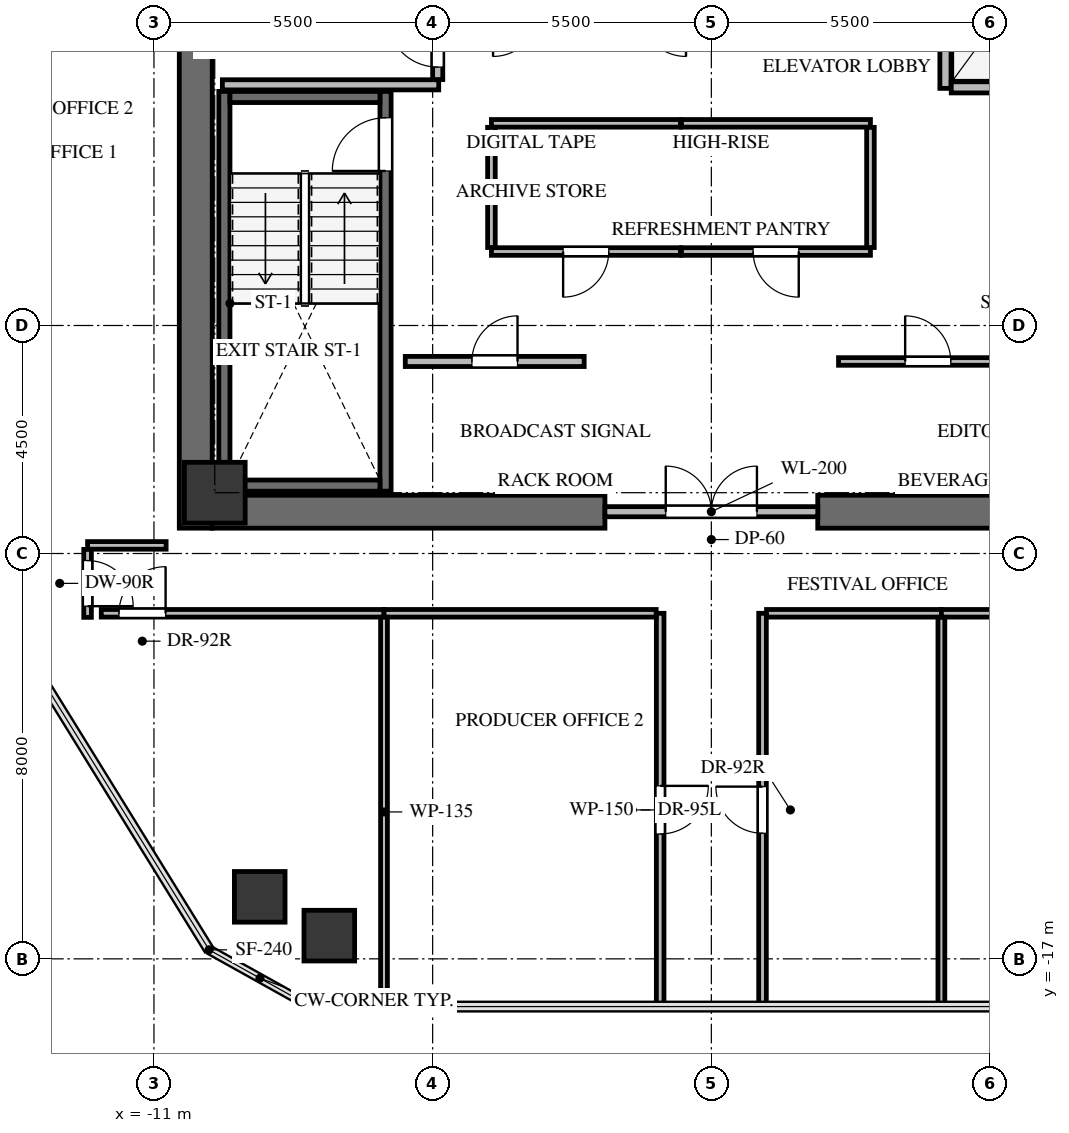
"""IFC4 building model, lengths in metres.
Left out: names, types, materials, properties, quantities, classifications, styles, units other than length and angle.
Written with IfcOpenShell. Run it as: python <this file> out.ifc"""

import sys

from ifc_helpers import new_model, si_unit, direction, frame, frame_2d, origin, origin_2d, place, context, subcontext, project, spatial, rectangle, extrude, source, transform, mapped, element, fill, save


model = new_model("IFC4")
c1 = context("Model", 3, precision=1e-05, world=origin(), true_north=direction((0.0, 1.0)))
c2 = subcontext(c1, "Body", "Model", "MODEL_VIEW")
j1 = project(units=[si_unit("LENGTHUNIT", "METRE"), si_unit("PLANEANGLEUNIT", "RADIAN")], contexts=[c1])
p1 = place(None, origin())
s1 = spatial("IfcSite", under=j1, at=p1, CompositionType="ELEMENT")
p2 = place(p1, origin())
s2 = spatial("IfcBuilding", under=s1, at=p2, CompositionType="ELEMENT")
p3 = place(p2, frame((0.0, 0.0, 173.8)))
s3 = spatial("IfcBuildingStorey", under=s2, at=p3, CompositionType="ELEMENT", Elevation=173.8)
p4 = place(p3, frame((-10.175, -8.5, 0.0), z_axis=(0.0, 0.0, 1.0), x_axis=(0.0, 1.0, 0.0)))
e1 = element("IfcWall", 1, at=p4, inside=s3, PredefinedType="SHEAR", context=c2, shape_type="SweptSolid", body=[
    extrude(rectangle(XDim=17.0, YDim=0.65, at=frame_2d((8.5, 0.0))), origin(), (0.0, 0.0, 1.0), 3.3),
])
for number, where, z_axis, x_axis in (
    (2, (-9.85, -8.175, 0.0), (0.0, 0.0, 1.0), (1.0, 0.0, 0.0)),
    (3, (2.1, -8.175, 0.0), (0.0, 0.0, 1.0), (1.0, 0.0, 0.0)),
):
    element("IfcWall", number, at=place(p3, frame(where, z_axis=z_axis, x_axis=x_axis)), inside=s3, PredefinedType="SHEAR", context=c2, shape_type="SweptSolid", body=[
        extrude(rectangle(XDim=7.75, YDim=0.65, at=frame_2d((3.875, 0.0))), origin(), (0.0, 0.0, 1.0), 3.3),
    ])
p5 = place(p3, frame((-6.43, -7.77, -0.24), z_axis=(0.0, 0.0, 1.0), x_axis=(0.0, 1.0, 0.0)))
e4 = element("IfcWall", 4, at=p5, inside=s3, PredefinedType="SHEAR", context=c2, shape_type="SweptSolid", body=[
    extrude(rectangle(XDim=7.89, YDim=0.22, at=frame_2d((3.945, 0.0))), origin(), (0.0, 0.0, 1.0), 3.3),
])
p6 = place(p5, frame((6.32, 0.0, 0.0)))
e5 = element("IfcOpeningElement", 5, at=p6, cuts=e4, PredefinedType="OPENING", context=c2, shape_type="SweptSolid", body=[
    extrude(rectangle(XDim=1.05, YDim=2.15, at=frame_2d((0.525, 1.075))), frame((0.0, 0.12, 0.0), z_axis=(0.0, -1.0, 0.0), x_axis=(1.0, 0.0, 0.0)), (0.0, 0.0, 1.0), 0.24),
])
p7 = place(p3, frame((-9.61, 0.12, -0.24), z_axis=(0.0, 0.0, 1.0), x_axis=(0.0, -1.0, 0.0)))
e6 = element("IfcWall", 6, at=p7, inside=s3, PredefinedType="SHEAR", context=c2, shape_type="SweptSolid", body=[
    extrude(rectangle(XDim=7.89, YDim=0.22, at=frame_2d((3.945, 0.0))), origin(), (0.0, 0.0, 1.0), 3.3),
])
for number, where, z_axis, x_axis in (
    (7, (-9.5, -7.66, -0.24), (0.0, 0.0, 1.0), (1.0, 0.0, 0.0)),
    (8, (-6.54, 0.01, -0.24), (0.0, 0.0, 1.0), (-1.0, 0.0, 0.0)),
):
    element("IfcWall", number, at=place(p3, frame(where, z_axis=z_axis, x_axis=x_axis)), inside=s3, PredefinedType="SHEAR", context=c2, shape_type="SweptSolid", body=[
        extrude(rectangle(XDim=2.96, YDim=0.22, at=frame_2d((1.48, 0.0))), origin(), (0.0, 0.0, 1.0), 3.3),
    ])
m1 = source(origin(), c2, "Body", "SweptSolid", [
    extrude(rectangle(XDim=1.2, YDim=1.2, at=origin_2d()), origin(), (0.0, 0.0, 1.0), 3.3),
])
p8 = place(p3, frame((-9.8, -7.8, -0.24), z_axis=(0.0, 0.0, 1.0), x_axis=(1.0, 0.0, 0.0)))
e9 = element("IfcColumn", 9, at=p8, inside=s3, PredefinedType="COLUMN", context=c2, shape_type="MappedRepresentation", body=[
    mapped(m1, transform((0.0, 0.0, 0.0), x_axis=(1.0, 0.0, 0.0), y_axis=(0.0, 1.0, 0.0), z_axis=(0.0, 0.0, 1.0), scale=1.0)),
])
m2 = source(origin(), c2, "Body", "SweptSolid", [
    extrude(rectangle(XDim=1.0, YDim=1.0, at=origin_2d()), origin(), (0.0, 0.0, 1.0), 3.3),
])
for number, where, z_axis, x_axis in (
    (10, (-8.913, -15.776, -0.24), (0.0, 0.0, 1.0), (1.0, 0.0, 0.0)),
    (11, (-7.54, -16.542, -0.24), (0.0, 0.0, 1.0), (1.0, 0.0, 0.0)),
):
    element("IfcColumn", number, at=place(p3, frame(where, z_axis=z_axis, x_axis=x_axis)), inside=s3, PredefinedType="COLUMN", context=c2, shape_type="MappedRepresentation", body=[
        mapped(m2, transform((0.0, 0.0, 0.0), x_axis=(1.0, 0.0, 0.0), y_axis=(0.0, 1.0, 0.0), z_axis=(0.0, 0.0, 1.0), scale=1.0)),
    ])
p9 = place(p3, frame((-2.1, -8.175, 0.0), z_axis=(0.0, 0.0, 1.0), x_axis=(1.0, 0.0, 0.0)))
e12 = element("IfcWall", 12, at=p9, inside=s3, PredefinedType="SOLIDWALL", context=c2, shape_type="SweptSolid", body=[
    extrude(rectangle(XDim=4.2, YDim=0.2, at=frame_2d((2.1, 0.0))), origin(), (0.0, 0.0, 1.0), 3.045),
])
p10 = place(p9, frame((1.2, 0.0, 0.0)))
e13 = element("IfcOpeningElement", 13, at=p10, cuts=e12, PredefinedType="OPENING", context=c2, shape_type="SweptSolid", body=[
    extrude(rectangle(XDim=1.8, YDim=2.15, at=frame_2d((0.9, 1.075))), frame((0.0, 0.11, 0.0), z_axis=(0.0, -1.0, 0.0), x_axis=(1.0, 0.0, 0.0)), (0.0, 0.0, 1.0), 0.22),
])
p11 = place(p3, frame((-9.65, 0.25, 0.0), z_axis=(0.0, 0.0, 1.0), x_axis=(1.0, 0.0, 0.0)))
e14 = element("IfcWall", 14, at=p11, inside=s3, PredefinedType="SOLIDWALL", context=c2, shape_type="SweptSolid", body=[
    extrude(rectangle(XDim=4.27, YDim=0.2, at=frame_2d((2.135, 0.0))), origin(), (0.0, 0.0, 1.0), 3.045),
])
p12 = place(p3, frame((-5.4, 0.354, 0.0), z_axis=(0.0, 0.0, 1.0), x_axis=(0.0, 1.0, 0.0)))
e15 = element("IfcWall", 15, at=p12, inside=s3, PredefinedType="SOLIDWALL", context=c2, shape_type="SweptSolid", body=[
    extrude(rectangle(XDim=4.026, YDim=0.2, at=frame_2d((2.013, 0.0))), origin(), (0.0, 0.0, 1.0), 3.045),
])
p13 = place(p12, frame((0.246, 0.0, 0.0)))
e16 = element("IfcOpeningElement", 16, at=p13, cuts=e15, PredefinedType="OPENING", context=c2, shape_type="SweptSolid", body=[
    extrude(rectangle(XDim=1.0, YDim=2.15, at=frame_2d((0.5, 1.075))), frame((0.0, 0.11, 0.0), z_axis=(0.0, -1.0, 0.0), x_axis=(1.0, 0.0, 0.0)), (0.0, 0.0, 1.0), 0.22),
])
p14 = place(p3, frame((4.62, 0.18, 0.0), z_axis=(0.0, 0.0, 1.0), x_axis=(0.0, 1.0, 0.0)))
e17 = element("IfcWall", 17, at=p14, inside=s3, PredefinedType="SOLIDWALL", context=c2, shape_type="SweptSolid", body=[
    extrude(rectangle(XDim=3.186, YDim=0.22, at=frame_2d((1.593, 0.0))), origin(), (0.0, 0.0, 1.0), 3.045),
])
p15 = place(p3, frame((4.734, 0.2, 0.0), z_axis=(0.0, 0.0, 1.0), x_axis=(1.0, 0.0, 0.0)))
e18 = element("IfcWall", 18, at=p15, inside=s3, PredefinedType="SOLIDWALL", context=c2, shape_type="SweptSolid", body=[
    extrude(rectangle(XDim=1.666, YDim=0.22, at=frame_2d((0.833, 0.0))), origin(), (0.0, 0.0, 1.0), 3.045),
])
p16 = place(p3, frame((-6.04, -5.21, 0.0), z_axis=(0.0, 0.0, 1.0), x_axis=(1.0, 0.0, 0.0)))
e19 = element("IfcWall", 19, at=p16, inside=s3, PredefinedType="SOLIDWALL", context=c2, shape_type="SweptSolid", body=[
    extrude(rectangle(XDim=3.53, YDim=0.2, at=frame_2d((1.765, 0.0))), origin(), (0.0, 0.0, 1.0), 3.045),
])
p17 = place(p16, frame((1.315, 0.0, 0.0)))
e20 = element("IfcOpeningElement", 20, at=p17, cuts=e19, PredefinedType="OPENING", context=c2, shape_type="SweptSolid", body=[
    extrude(rectangle(XDim=0.9, YDim=2.05, at=frame_2d((0.45, 1.025))), frame((0.0, 0.11, 0.0), z_axis=(0.0, -1.0, 0.0), x_axis=(1.0, 0.0, 0.0)), (0.0, 0.0, 1.0), 0.22),
])
p18 = place(p3, frame((2.51, -5.21, 0.0), z_axis=(0.0, 0.0, 1.0), x_axis=(1.0, 0.0, 0.0)))
e21 = element("IfcWall", 21, at=p18, inside=s3, PredefinedType="PARTITIONING", context=c2, shape_type="SweptSolid", body=[
    extrude(rectangle(XDim=3.53, YDim=0.15, at=frame_2d((1.765, 0.0))), origin(), (0.0, 0.0, 1.0), 3.045),
])
p19 = place(p18, frame((1.315, 0.0, 0.0)))
e22 = element("IfcOpeningElement", 22, at=p19, cuts=e21, PredefinedType="OPENING", context=c2, shape_type="SweptSolid", body=[
    extrude(rectangle(XDim=0.9, YDim=2.05, at=frame_2d((0.45, 1.025))), frame((0.0, 0.085, 0.0), z_axis=(0.0, -1.0, 0.0), x_axis=(1.0, 0.0, 0.0)), (0.0, 0.0, 1.0), 0.17),
])
p20 = place(p3, frame((-0.61, -3.04, 0.0), z_axis=(0.0, 0.0, 1.0), x_axis=(-1.0, 0.0, 0.0)))
e23 = element("IfcWall", 23, at=p20, inside=s3, PredefinedType="PARTITIONING", context=c2, shape_type="SweptSolid", body=[
    extrude(rectangle(XDim=3.73, YDim=0.15, at=frame_2d((1.865, 0.0))), origin(), (0.0, 0.0, 1.0), 3.045),
])
p21 = place(p20, frame((1.415, 0.0, 0.0)))
e24 = element("IfcOpeningElement", 24, at=p21, cuts=e23, PredefinedType="OPENING", context=c2, shape_type="SweptSolid", body=[
    extrude(rectangle(XDim=0.9, YDim=2.05, at=frame_2d((0.45, 1.025))), frame((0.0, 0.085, 0.0), z_axis=(0.0, -1.0, 0.0), x_axis=(1.0, 0.0, 0.0)), (0.0, 0.0, 1.0), 0.17),
])
p22 = place(p3, frame((-4.34, -0.51, 0.0), z_axis=(0.0, 0.0, 1.0), x_axis=(1.0, 0.0, 0.0)))
e25 = element("IfcWall", 25, at=p22, inside=s3, PredefinedType="PARTITIONING", context=c2, shape_type="SweptSolid", body=[
    extrude(rectangle(XDim=3.73, YDim=0.15, at=frame_2d((1.865, 0.0))), origin(), (0.0, 0.0, 1.0), 3.045),
])
p23 = place(p3, frame((-4.34, -2.961, 0.0), z_axis=(0.0, 0.0, 1.0), x_axis=(0.0, 1.0, 0.0)))
e26 = element("IfcWall", 26, at=p23, inside=s3, PredefinedType="PARTITIONING", context=c2, shape_type="SweptSolid", body=[
    extrude(rectangle(XDim=2.372, YDim=0.15, at=frame_2d((1.186, 0.0))), origin(), (0.0, 0.0, 1.0), 3.045),
])
p24 = place(p3, frame((3.14, -3.04, 0.0), z_axis=(0.0, 0.0, 1.0), x_axis=(-1.0, 0.0, 0.0)))
e27 = element("IfcWall", 27, at=p24, inside=s3, PredefinedType="PARTITIONING", context=c2, shape_type="SweptSolid", body=[
    extrude(rectangle(XDim=3.73, YDim=0.15, at=frame_2d((1.865, 0.0))), origin(), (0.0, 0.0, 1.0), 3.045),
])
p25 = place(p24, frame((1.415, 0.0, 0.0)))
e28 = element("IfcOpeningElement", 28, at=p25, cuts=e27, PredefinedType="OPENING", context=c2, shape_type="SweptSolid", body=[
    extrude(rectangle(XDim=0.9, YDim=2.05, at=frame_2d((0.45, 1.025))), frame((0.0, 0.085, 0.0), z_axis=(0.0, -1.0, 0.0), x_axis=(1.0, 0.0, 0.0)), (0.0, 0.0, 1.0), 0.17),
])
p26 = place(p3, frame((-0.59, -0.51, 0.0), z_axis=(0.0, 0.0, 1.0), x_axis=(1.0, 0.0, 0.0)))
e29 = element("IfcWall", 29, at=p26, inside=s3, PredefinedType="PARTITIONING", context=c2, shape_type="SweptSolid", body=[
    extrude(rectangle(XDim=3.73, YDim=0.15, at=frame_2d((1.865, 0.0))), origin(), (0.0, 0.0, 1.0), 3.045),
])
p27 = place(p3, frame((3.14, -0.589, 0.0), z_axis=(0.0, 0.0, 1.0), x_axis=(0.0, -1.0, 0.0)))
e30 = element("IfcWall", 30, at=p27, inside=s3, PredefinedType="PARTITIONING", context=c2, shape_type="SweptSolid", body=[
    extrude(rectangle(XDim=2.372, YDim=0.15, at=frame_2d((1.186, 0.0))), origin(), (0.0, 0.0, 1.0), 3.045),
])
p28 = place(p3, frame((-12.04, -10.18, 0.0), z_axis=(0.0, 0.0, 1.0), x_axis=(1.0, 0.0, 0.0)))
e31 = element("IfcWall", 31, at=p28, inside=s3, PredefinedType="PARTITIONING", context=c2, shape_type="SweptSolid", body=[
    extrude(rectangle(XDim=5.58, YDim=0.15, at=frame_2d((2.79, 0.0))), origin(), (0.0, 0.0, 1.0), 3.045),
])
p29 = place(p28, frame((0.35, 0.0, 0.0)))
e32 = element("IfcOpeningElement", 32, at=p29, cuts=e31, PredefinedType="OPENING", context=c2, shape_type="SweptSolid", body=[
    extrude(rectangle(XDim=0.92, YDim=2.1, at=frame_2d((0.46, 1.05))), frame((0.0, 0.085, 0.0), z_axis=(0.0, -1.0, 0.0), x_axis=(1.0, 0.0, 0.0)), (0.0, 0.0, 1.0), 0.17),
])
p30 = place(p3, frame((-1.01, -10.18, 0.0), z_axis=(0.0, 0.0, 1.0), x_axis=(0.0, -1.0, 0.0)))
e33 = element("IfcWall", 33, at=p30, inside=s3, PredefinedType="PARTITIONING", context=c2, shape_type="SweptSolid", body=[
    extrude(rectangle(XDim=7.762, YDim=0.15, at=frame_2d((3.881, 0.0))), origin(), (0.0, 0.0, 1.0), 2.399),
])
p31 = place(p30, frame((3.406, 0.0, 0.0)))
e34 = element("IfcOpeningElement", 34, at=p31, cuts=e33, PredefinedType="OPENING", context=c2, shape_type="SweptSolid", body=[
    extrude(rectangle(XDim=0.95, YDim=2.1, at=frame_2d((0.475, 1.05))), frame((0.0, 0.085, 0.0), z_axis=(0.0, -1.0, 0.0), x_axis=(1.0, 0.0, 0.0)), (0.0, 0.0, 1.0), 0.17),
])
p32 = place(p3, frame((-6.46, -10.18, 0.0), z_axis=(0.0, 0.0, 1.0), x_axis=(1.0, 0.0, 0.0)))
e35 = element("IfcWall", 35, at=p32, inside=s3, PredefinedType="PARTITIONING", context=c2, shape_type="SweptSolid", body=[
    extrude(rectangle(XDim=5.371, YDim=0.15, at=frame_2d((2.686, 0.0))), origin(), (0.0, 0.0, 1.0), 2.242),
])
p33 = place(p3, frame((1.01, -17.942, 0.0), z_axis=(0.0, 0.0, 1.0), x_axis=(0.0, 1.0, 0.0)))
e36 = element("IfcWall", 36, at=p33, inside=s3, PredefinedType="PARTITIONING", context=c2, shape_type="SweptSolid", body=[
    extrude(rectangle(XDim=7.762, YDim=0.15, at=frame_2d((3.881, 0.0))), origin(), (0.0, 0.0, 1.0), 2.399),
])
p34 = place(p33, frame((3.421, 0.0, 0.0)))
e37 = element("IfcOpeningElement", 37, at=p34, cuts=e36, PredefinedType="OPENING", context=c2, shape_type="SweptSolid", body=[
    extrude(rectangle(XDim=0.92, YDim=2.1, at=frame_2d((0.46, 1.05))), frame((0.0, 0.085, 0.0), z_axis=(0.0, -1.0, 0.0), x_axis=(1.0, 0.0, 0.0)), (0.0, 0.0, 1.0), 0.17),
])
p35 = place(p3, frame((1.089, -10.18, 0.0), z_axis=(0.0, 0.0, 1.0), x_axis=(1.0, 0.0, 0.0)))
e38 = element("IfcWall", 38, at=p35, inside=s3, PredefinedType="PARTITIONING", context=c2, shape_type="SweptSolid", body=[
    extrude(rectangle(XDim=3.451, YDim=0.15, at=frame_2d((1.726, 0.0))), origin(), (0.0, 0.0, 1.0), 2.242),
])
p36 = place(p3, frame((4.54, -10.18, 0.0), z_axis=(0.0, 0.0, 1.0), x_axis=(1.0, 0.0, 0.0)))
e39 = element("IfcWall", 39, at=p36, inside=s3, PredefinedType="PARTITIONING", context=c2, shape_type="SweptSolid", body=[
    extrude(rectangle(XDim=5.5, YDim=0.15, at=frame_2d((2.75, 0.0))), origin(), (0.0, 0.0, 1.0), 2.242),
])
p37 = place(p36, frame((2.3, 0.0, 0.0)))
e40 = element("IfcOpeningElement", 40, at=p37, cuts=e39, PredefinedType="OPENING", context=c2, shape_type="SweptSolid", body=[
    extrude(rectangle(XDim=0.9, YDim=2.05, at=frame_2d((0.45, 1.025))), frame((0.0, 0.085, 0.0), z_axis=(0.0, -1.0, 0.0), x_axis=(1.0, 0.0, 0.0)), (0.0, 0.0, 1.0), 0.17),
])
p38 = place(p3, frame((-10.76, -8.84, 0.0), z_axis=(0.0, 0.0, 1.0), x_axis=(-1.0, 0.0, 0.0)))
e41 = element("IfcWall", 41, at=p38, inside=s3, PredefinedType="PARTITIONING", context=c2, shape_type="SweptSolid", body=[
    extrude(rectangle(XDim=1.55, YDim=0.15, at=frame_2d((0.775, 0.0))), origin(), (0.0, 0.0, 1.0), 3.045),
])
p39 = place(p3, frame((-12.31, -8.919, 0.0), z_axis=(0.0, 0.0, 1.0), x_axis=(0.0, -1.0, 0.0)))
e42 = element("IfcWall", 42, at=p39, inside=s3, PredefinedType="PARTITIONING", context=c2, shape_type="SweptSolid", body=[
    extrude(rectangle(XDim=1.341, YDim=0.15, at=frame_2d((0.67, 0.0))), origin(), (0.0, 0.0, 1.0), 2.399),
])
p40 = place(p39, frame((0.22, 0.0, 0.0)))
e43 = element("IfcOpeningElement", 43, at=p40, cuts=e42, PredefinedType="OPENING", context=c2, shape_type="SweptSolid", body=[
    extrude(rectangle(XDim=0.9, YDim=2.05, at=frame_2d((0.45, 1.025))), frame((0.0, 0.085, 0.0), z_axis=(0.0, -1.0, 0.0), x_axis=(1.0, 0.0, 0.0)), (0.0, 0.0, 1.0), 0.17),
])
p41 = place(p3, frame((-6.46, -10.259, 0.0), z_axis=(0.0, 0.0, 1.0), x_axis=(0.0, -1.0, 0.0)))
e44 = element("IfcWall", 44, at=p41, inside=s3, PredefinedType="PARTITIONING", context=c2, shape_type="SweptSolid", body=[
    extrude(rectangle(XDim=7.683, YDim=0.135, at=frame_2d((3.841, 0.0))), origin(), (0.0, 0.0, 1.0), 2.242),
])
p42 = place(p3, frame((4.54, -10.259, 0.0), z_axis=(0.0, 0.0, 1.0), x_axis=(0.0, -1.0, 0.0)))
e45 = element("IfcWall", 45, at=p42, inside=s3, PredefinedType="PARTITIONING", context=c2, shape_type="SweptSolid", body=[
    extrude(rectangle(XDim=7.683, YDim=0.135, at=frame_2d((3.841, 0.0))), origin(), (0.0, 0.0, 1.0), 2.399),
])
m3 = source(origin(), c2, "Body", "SweptSolid", [
    extrude(rectangle(XDim=1.05, YDim=2.15, at=frame_2d((0.525, 1.075))), frame((0.0, 0.025, 0.0), z_axis=(0.0, -1.0, 0.0), x_axis=(1.0, 0.0, 0.0)), (0.0, 0.0, 1.0), 0.05),
])
p43 = place(p6, origin())
e46 = element("IfcDoor", 46, at=p43, inside=s3, OperationType="SINGLE_SWING_LEFT", PredefinedType="DOOR", context=c2, shape_type="MappedRepresentation", body=[
    mapped(m3, transform((0.0, 0.0, 0.0), x_axis=(1.0, 0.0, 0.0), y_axis=(0.0, 1.0, 0.0), z_axis=(0.0, 0.0, 1.0), scale=1.0)),
])
fill(e5, e46)
m4 = source(origin(), c2, "Body", "SweptSolid", [
    extrude(rectangle(XDim=1.8, YDim=2.15, at=frame_2d((0.9, 1.075))), frame((0.0, 0.025, 0.0), z_axis=(0.0, -1.0, 0.0), x_axis=(1.0, 0.0, 0.0)), (0.0, 0.0, 1.0), 0.05),
])
p44 = place(p10, origin())
e47 = element("IfcDoor", 47, at=p44, inside=s3, OperationType="DOUBLE_DOOR_SINGLE_SWING", PredefinedType="DOOR", context=c2, shape_type="MappedRepresentation", body=[
    mapped(m4, transform((0.0, 0.0, 0.0), x_axis=(1.0, 0.0, 0.0), y_axis=(0.0, 1.0, 0.0), z_axis=(0.0, 0.0, 1.0), scale=1.0)),
])
fill(e13, e47)
m5 = source(origin(), c2, "Body", "SweptSolid", [
    extrude(rectangle(XDim=1.0, YDim=2.15, at=frame_2d((0.5, 1.075))), frame((0.0, 0.025, 0.0), z_axis=(0.0, -1.0, 0.0), x_axis=(1.0, 0.0, 0.0)), (0.0, 0.0, 1.0), 0.05),
])
p45 = place(p13, origin())
e48 = element("IfcDoor", 48, at=p45, inside=s3, OperationType="SINGLE_SWING_RIGHT", PredefinedType="DOOR", context=c2, shape_type="MappedRepresentation", body=[
    mapped(m5, transform((0.0, 0.0, 0.0), x_axis=(1.0, 0.0, 0.0), y_axis=(0.0, 1.0, 0.0), z_axis=(0.0, 0.0, 1.0), scale=1.0)),
])
fill(e16, e48)
m6 = source(origin(), c2, "Body", "SweptSolid", [
    extrude(rectangle(XDim=0.9, YDim=2.05, at=frame_2d((0.45, 1.025))), frame((0.0, 0.025, 0.0), z_axis=(0.0, -1.0, 0.0), x_axis=(1.0, 0.0, 0.0)), (0.0, 0.0, 1.0), 0.05),
])
p46 = place(p17, origin())
e49 = element("IfcDoor", 49, at=p46, inside=s3, OperationType="SINGLE_SWING_RIGHT", PredefinedType="DOOR", context=c2, shape_type="MappedRepresentation", body=[
    mapped(m6, transform((0.0, 0.0, 0.0), x_axis=(1.0, 0.0, 0.0), y_axis=(0.0, 1.0, 0.0), z_axis=(0.0, 0.0, 1.0), scale=1.0)),
])
fill(e20, e49)
m7 = source(origin(), c2, "Body", "SweptSolid", [
    extrude(rectangle(XDim=0.9, YDim=2.05, at=frame_2d((0.45, 1.025))), frame((0.0, 0.025, 0.0), z_axis=(0.0, -1.0, 0.0), x_axis=(1.0, 0.0, 0.0)), (0.0, 0.0, 1.0), 0.05),
])
p47 = place(p19, origin())
e50 = element("IfcDoor", 50, at=p47, inside=s3, OperationType="SINGLE_SWING_LEFT", PredefinedType="DOOR", context=c2, shape_type="MappedRepresentation", body=[
    mapped(m7, transform((0.0, 0.0, 0.0), x_axis=(1.0, 0.0, 0.0), y_axis=(0.0, 1.0, 0.0), z_axis=(0.0, 0.0, 1.0), scale=1.0)),
])
fill(e22, e50)
p48 = place(p21, origin())
e51 = element("IfcDoor", 51, at=p48, inside=s3, OperationType="SINGLE_SWING_RIGHT", PredefinedType="DOOR", context=c2, shape_type="MappedRepresentation", body=[
    mapped(m6, transform((0.0, 0.0, 0.0), x_axis=(1.0, 0.0, 0.0), y_axis=(0.0, 1.0, 0.0), z_axis=(0.0, 0.0, 1.0), scale=1.0)),
])
fill(e24, e51)
p49 = place(p25, origin())
e52 = element("IfcDoor", 52, at=p49, inside=s3, OperationType="SINGLE_SWING_LEFT", PredefinedType="DOOR", context=c2, shape_type="MappedRepresentation", body=[
    mapped(m7, transform((0.0, 0.0, 0.0), x_axis=(1.0, 0.0, 0.0), y_axis=(0.0, 1.0, 0.0), z_axis=(0.0, 0.0, 1.0), scale=1.0)),
])
fill(e28, e52)
m8 = source(origin(), c2, "Body", "SweptSolid", [
    extrude(rectangle(XDim=0.92, YDim=2.1, at=frame_2d((0.46, 1.05))), frame((0.0, 0.025, 0.0), z_axis=(0.0, -1.0, 0.0), x_axis=(1.0, 0.0, 0.0)), (0.0, 0.0, 1.0), 0.05),
])
p50 = place(p29, origin())
e53 = element("IfcDoor", 53, at=p50, inside=s3, OperationType="SINGLE_SWING_RIGHT", PredefinedType="DOOR", context=c2, shape_type="MappedRepresentation", body=[
    mapped(m8, transform((0.0, 0.0, 0.0), x_axis=(1.0, 0.0, 0.0), y_axis=(0.0, 1.0, 0.0), z_axis=(0.0, 0.0, 1.0), scale=1.0)),
])
fill(e32, e53)
m9 = source(origin(), c2, "Body", "SweptSolid", [
    extrude(rectangle(XDim=0.95, YDim=2.1, at=frame_2d((0.475, 1.05))), frame((0.0, 0.025, 0.0), z_axis=(0.0, -1.0, 0.0), x_axis=(1.0, 0.0, 0.0)), (0.0, 0.0, 1.0), 0.05),
])
p51 = place(p31, origin())
e54 = element("IfcDoor", 54, at=p51, inside=s3, OperationType="SINGLE_SWING_LEFT", PredefinedType="DOOR", context=c2, shape_type="MappedRepresentation", body=[
    mapped(m9, transform((0.0, 0.0, 0.0), x_axis=(1.0, 0.0, 0.0), y_axis=(0.0, 1.0, 0.0), z_axis=(0.0, 0.0, 1.0), scale=1.0)),
])
fill(e34, e54)
p52 = place(p34, origin())
e55 = element("IfcDoor", 55, at=p52, inside=s3, OperationType="SINGLE_SWING_RIGHT", PredefinedType="DOOR", context=c2, shape_type="MappedRepresentation", body=[
    mapped(m8, transform((0.0, 0.0, 0.0), x_axis=(1.0, 0.0, 0.0), y_axis=(0.0, 1.0, 0.0), z_axis=(0.0, 0.0, 1.0), scale=1.0)),
])
fill(e37, e55)
m10 = source(origin(), c2, "Body", "SweptSolid", [
    extrude(rectangle(XDim=0.9, YDim=2.05, at=frame_2d((0.45, 1.025))), frame((0.0, 0.025, 0.0), z_axis=(0.0, -1.0, 0.0), x_axis=(1.0, 0.0, 0.0)), (0.0, 0.0, 1.0), 0.05),
])
p53 = place(p40, origin())
e56 = element("IfcDoor", 56, at=p53, inside=s3, OperationType="SINGLE_SWING_RIGHT", PredefinedType="DOOR", context=c2, shape_type="MappedRepresentation", body=[
    mapped(m10, transform((0.0, 0.0, 0.0), x_axis=(1.0, 0.0, 0.0), y_axis=(0.0, 1.0, 0.0), z_axis=(0.0, 0.0, 1.0), scale=1.0)),
])
fill(e43, e56)
save(model, sys.argv[1])
